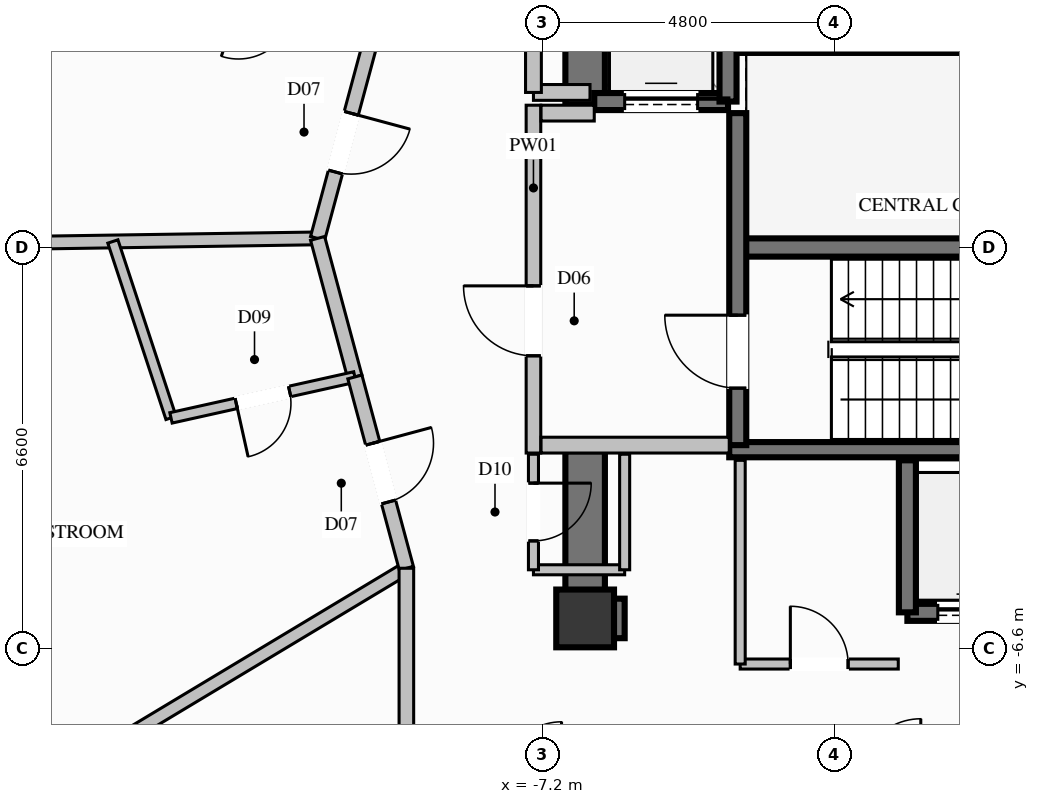
"""IFC4 building model, lengths in metres.
Left out: names, types, materials, properties, quantities, classifications, styles, units other than length and angle.
Written with IfcOpenShell. Run it as: python <this file> out.ifc"""

import sys

from ifc_helpers import new_model, si_unit, direction, frame, frame_2d, origin, origin_2d, place, context, subcontext, project, spatial, rectangle, extrude, element, fill, save


model = new_model("IFC4")
c1 = context("Model", 3, precision=1e-05, world=origin(), true_north=direction((0.0, 1.0)))
c2 = subcontext(c1, "Body", "Model", "MODEL_VIEW")
j1 = project(units=[si_unit("LENGTHUNIT", "METRE"), si_unit("PLANEANGLEUNIT", "RADIAN")], contexts=[c1])
p1 = place(None, origin())
s1 = spatial("IfcSite", under=j1, at=p1, CompositionType="ELEMENT")
p2 = place(p1, origin())
s2 = spatial("IfcBuilding", under=s1, at=p2, CompositionType="ELEMENT")
p3 = place(p2, frame((0.0, 0.0, 135.0)))
s3 = spatial("IfcBuildingStorey", under=s2, at=p3, CompositionType="ELEMENT", Elevation=135.0)
p4 = place(p3, frame((-6.5, -6.1, 0.0), z_axis=(0.0, 0.0, 1.0), x_axis=(1.0, 0.0, 0.0)))
e1 = element("IfcColumn", 1, at=p4, inside=s3, PredefinedType="COLUMN", context=c2, shape_type="SweptSolid", body=[
    extrude(rectangle(XDim=0.95, YDim=0.95, at=origin_2d()), origin(), (0.0, 0.0, 1.0), 3.6),
])
p5 = place(p3, frame((-3.99, 0.0, 0.0), z_axis=(0.0, 0.0, 1.0), x_axis=(1.0, 0.0, 0.0)))
e2 = element("IfcWall", 2, at=p5, inside=s3, PredefinedType="SHEAR", context=c2, shape_type="SweptSolid", body=[
    extrude(rectangle(XDim=7.98, YDim=0.3, at=frame_2d((3.99, 0.0))), origin(), (0.0, 0.0, 1.0), 3.6),
])
for number, where, z_axis, x_axis in (
    (3, (-4.13, -3.325, 0.0), (0.0, 0.0, 1.0), (1.0, 0.0, 0.0)),
    (4, (-4.13, 3.325, 0.0), (0.0, 0.0, 1.0), (1.0, 0.0, 0.0)),
):
    element("IfcWall", number, at=place(p3, frame(where, z_axis=z_axis, x_axis=x_axis)), inside=s3, PredefinedType="SOLIDWALL", context=c2, shape_type="SweptSolid", body=[
        extrude(rectangle(XDim=8.26, YDim=0.25, at=frame_2d((4.13, 0.0))), origin(), (0.0, 0.0, 1.0), 3.6),
    ])
p6 = place(p3, frame((-6.175, -6.1, 0.0), z_axis=(0.0, 0.0, 1.0), x_axis=(1.0, 0.0, 0.0)))
e5 = element("IfcWall", 5, at=p6, inside=s3, PredefinedType="SHEAR", context=c2, shape_type="SweptSolid", body=[
    extrude(rectangle(XDim=0.325, YDim=0.65, at=frame_2d((0.163, 0.0))), origin(), (0.0, 0.0, 1.0), 3.6),
])
p7 = place(p3, frame((-6.5, 2.35, 0.0), z_axis=(0.0, 0.0, 1.0), x_axis=(0.0, 1.0, 0.0)))
e6 = element("IfcWall", 6, at=p7, inside=s3, PredefinedType="SHEAR", context=c2, shape_type="SweptSolid", body=[
    extrude(rectangle(XDim=4.075, YDim=0.65, at=frame_2d((2.038, 0.0))), origin(), (0.0, 0.0, 1.0), 3.6),
])
p8 = place(p3, frame((-6.5, -6.425, 0.0), z_axis=(0.0, 0.0, 1.0), x_axis=(0.0, 1.0, 0.0)))
e7 = element("IfcWall", 7, at=p8, inside=s3, PredefinedType="SHEAR", context=c2, shape_type="SweptSolid", body=[
    extrude(rectangle(XDim=3.075, YDim=0.65, at=frame_2d((1.538, 0.0))), origin(), (0.0, 0.0, 1.0), 3.6),
])
p9 = place(p3, frame((-1.2, -6.0, 0.0), z_axis=(0.0, 0.0, 1.0), x_axis=(1.0, 0.0, 0.0)))
e8 = element("IfcWall", 8, at=p9, inside=s3, PredefinedType="SOLIDWALL", context=c2, shape_type="SweptSolid", body=[
    extrude(rectangle(XDim=2.1, YDim=0.28, at=frame_2d((1.05, 0.0))), origin(), (0.0, 0.0, 1.0), 3.35),
])
p10 = place(p9, frame((0.5, 0.0, 0.0)))
e9 = element("IfcOpeningElement", 9, at=p10, cuts=e8, PredefinedType="OPENING", context=c2, shape_type="SweptSolid", body=[
    extrude(rectangle(XDim=1.1, YDim=2.2, at=frame_2d((0.55, 1.1))), frame((0.0, 0.15, 0.0), z_axis=(0.0, -1.0, 0.0), x_axis=(1.0, 0.0, 0.0)), (0.0, 0.0, 1.0), 0.3),
])
p11 = place(p3, frame((-1.2, -3.5, 0.0), z_axis=(0.0, 0.0, 1.0), x_axis=(0.0, -1.0, 0.0)))
e10 = element("IfcWall", 10, at=p11, inside=s3, PredefinedType="SOLIDWALL", context=c2, shape_type="SweptSolid", body=[
    extrude(rectangle(XDim=2.5, YDim=0.28, at=frame_2d((1.25, 0.0))), origin(), (0.0, 0.0, 1.0), 3.35),
])
p12 = place(p3, frame((-6.35, 2.4, 0.0), z_axis=(0.0, 0.0, 1.0), x_axis=(1.0, 0.0, 0.0)))
e11 = element("IfcWall", 11, at=p12, inside=s3, PredefinedType="SOLIDWALL", context=c2, shape_type="SweptSolid", body=[
    extrude(rectangle(XDim=2.2, YDim=0.28, at=frame_2d((1.1, 0.0))), origin(), (0.0, 0.0, 1.0), 3.35),
])
p13 = place(p12, frame((0.5, 0.0, 0.0)))
e12 = element("IfcOpeningElement", 12, at=p13, cuts=e11, PredefinedType="OPENING", context=c2, shape_type="SweptSolid", body=[
    extrude(rectangle(XDim=1.2, YDim=2.2, at=frame_2d((0.6, 1.1))), frame((0.0, 0.15, 0.0), z_axis=(0.0, -1.0, 0.0), x_axis=(1.0, 0.0, 0.0)), (0.0, 0.0, 1.0), 0.3),
])
p14 = place(p3, frame((-4.15, 2.4, 0.0), z_axis=(0.0, 0.0, 1.0), x_axis=(0.0, 1.0, 0.0)))
e13 = element("IfcWall", 13, at=p14, inside=s3, PredefinedType="SOLIDWALL", context=c2, shape_type="SweptSolid", body=[
    extrude(rectangle(XDim=2.7, YDim=0.28, at=frame_2d((1.35, 0.0))), origin(), (0.0, 0.0, 1.0), 3.35),
])
p15 = place(p3, frame((-3.99, -3.25, 0.0), z_axis=(0.0, 0.0, 1.0), x_axis=(0.0, 1.0, 0.0)))
e14 = element("IfcWall", 14, at=p15, inside=s3, PredefinedType="SOLIDWALL", context=c2, shape_type="SweptSolid", body=[
    extrude(rectangle(XDim=5.46, YDim=0.28, at=frame_2d((2.73, 0.0))), origin(), (0.0, 0.0, 1.0), 3.35),
])
p16 = place(p15, frame((0.937, 0.0, 0.0)))
e15 = element("IfcOpeningElement", 15, at=p16, cuts=e14, PredefinedType="OPENING", context=c2, shape_type="SweptSolid", body=[
    extrude(rectangle(XDim=1.2, YDim=2.2, at=frame_2d((0.6, 1.1))), frame((0.0, 0.15, 0.0), z_axis=(0.0, -1.0, 0.0), x_axis=(1.0, 0.0, 0.0)), (0.0, 0.0, 1.0), 0.3),
])
p17 = place(p3, frame((-7.35, -3.38, 0.0), z_axis=(0.0, 0.0, 1.0), x_axis=(0.0, 1.0, 0.0)))
e16 = element("IfcWall", 16, at=p17, inside=s3, PredefinedType="PARTITIONING", context=c2, shape_type="SweptSolid", body=[
    extrude(rectangle(XDim=5.72, YDim=0.24, at=frame_2d((2.86, 0.0))), origin(), (0.0, 0.0, 1.0), 2.435),
])
p18 = place(p17, frame((1.599, 0.0, 0.0)))
e17 = element("IfcOpeningElement", 17, at=p18, cuts=e16, PredefinedType="OPENING", context=c2, shape_type="SweptSolid", body=[
    extrude(rectangle(XDim=1.15, YDim=2.2, at=frame_2d((0.575, 1.1))), frame((0.0, 0.13, 0.0), z_axis=(0.0, -1.0, 0.0), x_axis=(1.0, 0.0, 0.0)), (0.0, 0.0, 1.0), 0.26),
])
p19 = place(p3, frame((-7.225, -3.25, 0.0), z_axis=(0.0, 0.0, 1.0), x_axis=(1.0, 0.0, 0.0)))
e18 = element("IfcWall", 18, at=p19, inside=s3, PredefinedType="PARTITIONING", context=c2, shape_type="SweptSolid", body=[
    extrude(rectangle(XDim=3.095, YDim=0.26, at=frame_2d((1.548, 0.0))), origin(), (0.0, 0.0, 1.0), 3.35),
])
p20 = place(p3, frame((-7.225, 2.21, 0.0), z_axis=(0.0, 0.0, 1.0), x_axis=(1.0, 0.0, 0.0)))
e19 = element("IfcWall", 19, at=p20, inside=s3, PredefinedType="PARTITIONING", context=c2, shape_type="SweptSolid", body=[
    extrude(rectangle(XDim=0.875, YDim=0.26, at=frame_2d((0.438, 0.0))), origin(), (0.0, 0.0, 1.0), 3.35),
])
p21 = place(p3, frame((-7.35, 2.55, 0.0), z_axis=(0.0, 0.0, 1.0), x_axis=(1.0, 0.0, 0.0)))
e20 = element("IfcWall", 20, at=p21, inside=s3, PredefinedType="PARTITIONING", context=c2, shape_type="SweptSolid", body=[
    extrude(rectangle(XDim=0.93, YDim=0.26, at=frame_2d((0.465, 0.0))), origin(), (0.0, 0.0, 1.0), 3.35),
])
p22 = place(p3, frame((-7.35, 2.55, 0.0), z_axis=(0.0, 0.0, 1.0), x_axis=(0.0, 1.0, 0.0)))
e21 = element("IfcWall", 21, at=p22, inside=s3, PredefinedType="PARTITIONING", context=c2, shape_type="SweptSolid", body=[
    extrude(rectangle(XDim=2.4, YDim=0.26, at=frame_2d((1.2, 0.0))), origin(), (0.0, 0.0, 1.0), 2.435),
])
p23 = place(p22, frame((0.775, 0.0, 0.0)))
e22 = element("IfcOpeningElement", 22, at=p23, cuts=e21, PredefinedType="OPENING", context=c2, shape_type="SweptSolid", body=[
    extrude(rectangle(XDim=0.85, YDim=2.05, at=frame_2d((0.425, 1.025))), frame((0.0, 0.14, 0.0), z_axis=(0.0, -1.0, 0.0), x_axis=(1.0, 0.0, 0.0)), (0.0, 0.0, 1.0), 0.28),
])
p24 = place(p3, frame((-7.35, -5.3, 0.0), z_axis=(0.0, 0.0, 1.0), x_axis=(1.0, 0.0, 0.0)))
e23 = element("IfcWall", 23, at=p24, inside=s3, PredefinedType="PARTITIONING", context=c2, shape_type="SweptSolid", body=[
    extrude(rectangle(XDim=1.5, YDim=0.165, at=frame_2d((0.75, 0.0))), origin(), (0.0, 0.0, 1.0), 2.435),
])
p25 = place(p3, frame((-5.85, -5.3, 0.0), z_axis=(0.0, 0.0, 1.0), x_axis=(0.0, 1.0, 0.0)))
e24 = element("IfcWall", 24, at=p25, inside=s3, PredefinedType="PARTITIONING", context=c2, shape_type="SweptSolid", body=[
    extrude(rectangle(XDim=1.9, YDim=0.165, at=frame_2d((0.95, 0.0))), origin(), (0.0, 0.0, 1.0), 2.435),
])
p26 = place(p3, frame((-7.35, -3.4, 0.0), z_axis=(0.0, 0.0, 1.0), x_axis=(0.0, -1.0, 0.0)))
e25 = element("IfcWall", 25, at=p26, inside=s3, PredefinedType="PARTITIONING", context=c2, shape_type="SweptSolid", body=[
    extrude(rectangle(XDim=1.9, YDim=0.165, at=frame_2d((0.95, 0.0))), origin(), (0.0, 0.0, 1.0), 3.35),
])
p27 = place(p26, frame((0.475, 0.0, 0.0)))
e26 = element("IfcOpeningElement", 26, at=p27, cuts=e25, PredefinedType="OPENING", context=c2, shape_type="SweptSolid", body=[
    extrude(rectangle(XDim=0.95, YDim=2.1, at=frame_2d((0.475, 1.05))), frame((0.0, 0.093, 0.0), z_axis=(0.0, -1.0, 0.0), x_axis=(1.0, 0.0, 0.0)), (0.0, 0.0, 1.0), 0.185),
])
p28 = place(p3, frame((-3.95, -6.85, 0.0), z_axis=(0.0, 0.0, 1.0), x_axis=(1.0, 0.0, 0.0)))
e27 = element("IfcWall", 27, at=p28, inside=s3, PredefinedType="PARTITIONING", context=c2, shape_type="SweptSolid", body=[
    extrude(rectangle(XDim=2.6, YDim=0.165, at=frame_2d((1.3, 0.0))), origin(), (0.0, 0.0, 1.0), 2.435),
])
p29 = place(p28, frame((0.825, 0.0, 0.0)))
e28 = element("IfcOpeningElement", 28, at=p29, cuts=e27, PredefinedType="OPENING", context=c2, shape_type="SweptSolid", body=[
    extrude(rectangle(XDim=0.95, YDim=2.1, at=frame_2d((0.475, 1.05))), frame((0.0, 0.093, 0.0), z_axis=(0.0, -1.0, 0.0), x_axis=(1.0, 0.0, 0.0)), (0.0, 0.0, 1.0), 0.185),
])
p30 = place(p3, frame((-3.95, -3.5, 0.0), z_axis=(0.0, 0.0, 1.0), x_axis=(0.0, -1.0, 0.0)))
e29 = element("IfcWall", 29, at=p30, inside=s3, PredefinedType="PARTITIONING", context=c2, shape_type="SweptSolid", body=[
    extrude(rectangle(XDim=3.35, YDim=0.165, at=frame_2d((1.675, 0.0))), origin(), (0.0, 0.0, 1.0), 3.35),
])
p31 = place(p3, frame((-10.9, 0.15, 0.0), z_axis=(0.0, 0.0, 1.0), x_axis=(-0.999885899777, -0.015105873936, 0.0)))
e30 = element("IfcWall", 30, at=p31, inside=s3, PredefinedType="PARTITIONING", context=c2, shape_type="SweptSolid", body=[
    extrude(rectangle(XDim=5.56, YDim=0.21, at=frame_2d((2.78, 0.0))), origin(), (0.0, 0.0, 1.0), 2.419),
])
p32 = place(p3, frame((-9.44, -5.275, 0.0), z_axis=(0.0, 0.0, 1.0), x_axis=(-0.857218051621, -0.514953601769, 0.0)))
e31 = element("IfcWall", 31, at=p32, inside=s3, PredefinedType="PARTITIONING", context=c2, shape_type="SweptSolid", body=[
    extrude(rectangle(XDim=5.645, YDim=0.21, at=frame_2d((2.823, 0.0))), origin(), (0.0, 0.0, 1.0), 2.717),
])
p33 = place(p3, frame((-10.053, 3.297, 0.0), z_axis=(0.0, 0.0, 1.0), x_axis=(-0.25985795735, -0.965646851598, 0.0)))
e32 = element("IfcWall", 32, at=p33, inside=s3, PredefinedType="PARTITIONING", context=c2, shape_type="SweptSolid", body=[
    extrude(rectangle(XDim=3.259, YDim=0.24, at=frame_2d((1.63, 0.0))), origin(), (0.0, 0.0, 1.0), 3.35),
])
p34 = place(p33, frame((1.129, 0.0, 0.0)))
e33 = element("IfcOpeningElement", 33, at=p34, cuts=e32, PredefinedType="OPENING", context=c2, shape_type="SweptSolid", body=[
    extrude(rectangle(XDim=1.0, YDim=2.2, at=frame_2d((0.5, 1.1))), frame((0.0, 0.13, 0.0), z_axis=(0.0, -1.0, 0.0), x_axis=(1.0, 0.0, 0.0)), (0.0, 0.0, 1.0), 0.26),
])
p35 = place(p3, frame((-10.9, 0.15, 0.0), z_axis=(0.0, 0.0, 1.0), x_axis=(0.259684059781, -0.965693631073, 0.0)))
e34 = element("IfcWall", 34, at=p35, inside=s3, PredefinedType="PARTITIONING", context=c2, shape_type="SweptSolid", body=[
    extrude(rectangle(XDim=2.36, YDim=0.24, at=frame_2d((1.18, 0.0))), origin(), (0.0, 0.0, 1.0), 3.35),
])
p36 = place(p3, frame((-14.267, 0.099, 0.0), z_axis=(0.0, 0.0, 1.0), x_axis=(0.31298893544, -0.949756772175, 0.0)))
e35 = element("IfcWall", 35, at=p36, inside=s3, PredefinedType="PLUMBINGWALL", context=c2, shape_type="SweptSolid", body=[
    extrude(rectangle(XDim=3.055, YDim=0.175, at=frame_2d((1.527, 0.0))), origin(), (0.0, 0.0, 1.0), 3.35),
])
p37 = place(p3, frame((-10.287, -2.129, 0.0), z_axis=(0.0, 0.0, 1.0), x_axis=(-0.976110974076, -0.217272562209, 0.0)))
e36 = element("IfcWall", 36, at=p37, inside=s3, PredefinedType="PLUMBINGWALL", context=c2, shape_type="SweptSolid", body=[
    extrude(rectangle(XDim=3.098, YDim=0.175, at=frame_2d((1.549, 0.0))), origin(), (0.0, 0.0, 1.0), 3.35),
])
p38 = place(p37, frame((1.099, 0.0, 0.0)))
e37 = element("IfcOpeningElement", 37, at=p38, cuts=e36, PredefinedType="OPENING", context=c2, shape_type="SweptSolid", body=[
    extrude(rectangle(XDim=0.9, YDim=2.1, at=frame_2d((0.45, 1.05))), frame((0.0, 0.098, 0.0), z_axis=(0.0, -1.0, 0.0), x_axis=(1.0, 0.0, 0.0)), (0.0, 0.0, 1.0), 0.195),
])
p39 = place(p3, frame((-10.287, -2.129, 0.0), z_axis=(0.0, 0.0, 1.0), x_axis=(0.260021844471, -0.965602734253, 0.0)))
e38 = element("IfcWall", 38, at=p39, inside=s3, PredefinedType="PARTITIONING", context=c2, shape_type="SweptSolid", body=[
    extrude(rectangle(XDim=3.258, YDim=0.24, at=frame_2d((1.629, 0.0))), origin(), (0.0, 0.0, 1.0), 3.35),
])
p40 = place(p39, frame((1.129, 0.0, 0.0)))
e39 = element("IfcOpeningElement", 39, at=p40, cuts=e38, PredefinedType="OPENING", context=c2, shape_type="SweptSolid", body=[
    extrude(rectangle(XDim=1.0, YDim=2.2, at=frame_2d((0.5, 1.1))), frame((0.0, 0.13, 0.0), z_axis=(0.0, -1.0, 0.0), x_axis=(1.0, 0.0, 0.0)), (0.0, 0.0, 1.0), 0.26),
])
p41 = place(p3, frame((-9.44, -5.275, 0.0), z_axis=(0.0, 0.0, 1.0), x_axis=(0.0, -1.0, 0.0)))
e40 = element("IfcWall", 40, at=p41, inside=s3, PredefinedType="PARTITIONING", context=c2, shape_type="SweptSolid", body=[
    extrude(rectangle(XDim=3.475, YDim=0.24, at=frame_2d((1.738, 0.0))), origin(), (0.0, 0.0, 1.0), 3.35),
])
p42 = place(p10, origin())
e41 = element("IfcDoor", 41, at=p42, inside=s3, OperationType="SLIDING_TO_LEFT", PredefinedType="DOOR", context=c2, shape_type="SweptSolid", body=[
    extrude(rectangle(XDim=1.1, YDim=2.2, at=frame_2d((0.55, 1.1))), frame((0.0, 0.025, 0.0), z_axis=(0.0, -1.0, 0.0), x_axis=(1.0, 0.0, 0.0)), (0.0, 0.0, 1.0), 0.05),
])
fill(e9, e41)
p43 = place(p13, origin())
e42 = element("IfcDoor", 42, at=p43, inside=s3, OperationType="SLIDING_TO_LEFT", PredefinedType="DOOR", context=c2, shape_type="SweptSolid", body=[
    extrude(rectangle(XDim=1.2, YDim=2.2, at=frame_2d((0.6, 1.1))), frame((0.0, 0.025, 0.0), z_axis=(0.0, -1.0, 0.0), x_axis=(1.0, 0.0, 0.0)), (0.0, 0.0, 1.0), 0.05),
])
fill(e12, e42)
p44 = place(p16, origin())
e43 = element("IfcDoor", 43, at=p44, inside=s3, OperationType="SINGLE_SWING_RIGHT", PredefinedType="DOOR", context=c2, shape_type="SweptSolid", body=[
    extrude(rectangle(XDim=1.2, YDim=2.2, at=frame_2d((0.6, 1.1))), frame((0.0, 0.025, 0.0), z_axis=(0.0, -1.0, 0.0), x_axis=(1.0, 0.0, 0.0)), (0.0, 0.0, 1.0), 0.05),
])
fill(e15, e43)
p45 = place(p18, origin())
e44 = element("IfcDoor", 44, at=p45, inside=s3, OperationType="SINGLE_SWING_RIGHT", PredefinedType="DOOR", context=c2, shape_type="SweptSolid", body=[
    extrude(rectangle(XDim=1.15, YDim=2.2, at=frame_2d((0.575, 1.1))), frame((0.0, 0.025, 0.0), z_axis=(0.0, -1.0, 0.0), x_axis=(1.0, 0.0, 0.0)), (0.0, 0.0, 1.0), 0.05),
])
fill(e17, e44)
p46 = place(p27, origin())
e45 = element("IfcDoor", 45, at=p46, inside=s3, OperationType="SINGLE_SWING_LEFT", PredefinedType="DOOR", context=c2, shape_type="SweptSolid", body=[
    extrude(rectangle(XDim=0.95, YDim=2.1, at=frame_2d((0.475, 1.05))), frame((0.0, 0.025, 0.0), z_axis=(0.0, -1.0, 0.0), x_axis=(1.0, 0.0, 0.0)), (0.0, 0.0, 1.0), 0.05),
])
fill(e26, e45)
p47 = place(p29, origin())
e46 = element("IfcDoor", 46, at=p47, inside=s3, OperationType="SINGLE_SWING_LEFT", PredefinedType="DOOR", context=c2, shape_type="SweptSolid", body=[
    extrude(rectangle(XDim=0.95, YDim=2.1, at=frame_2d((0.475, 1.05))), frame((0.0, 0.025, 0.0), z_axis=(0.0, -1.0, 0.0), x_axis=(1.0, 0.0, 0.0)), (0.0, 0.0, 1.0), 0.05),
])
fill(e28, e46)
p48 = place(p34, origin())
e47 = element("IfcDoor", 47, at=p48, inside=s3, OperationType="SINGLE_SWING_LEFT", PredefinedType="DOOR", context=c2, shape_type="SweptSolid", body=[
    extrude(rectangle(XDim=1.0, YDim=2.2, at=frame_2d((0.5, 1.1))), frame((0.0, 0.025, 0.0), z_axis=(0.0, -1.0, 0.0), x_axis=(1.0, 0.0, 0.0)), (0.0, 0.0, 1.0), 0.05),
])
fill(e33, e47)
p49 = place(p38, origin())
e48 = element("IfcDoor", 48, at=p49, inside=s3, OperationType="SINGLE_SWING_RIGHT", PredefinedType="DOOR", context=c2, shape_type="SweptSolid", body=[
    extrude(rectangle(XDim=0.9, YDim=2.1, at=frame_2d((0.45, 1.05))), frame((0.0, 0.025, 0.0), z_axis=(0.0, -1.0, 0.0), x_axis=(1.0, 0.0, 0.0)), (0.0, 0.0, 1.0), 0.05),
])
fill(e37, e48)
p50 = place(p40, origin())
e49 = element("IfcDoor", 49, at=p50, inside=s3, OperationType="SINGLE_SWING_LEFT", PredefinedType="DOOR", context=c2, shape_type="SweptSolid", body=[
    extrude(rectangle(XDim=1.0, YDim=2.2, at=frame_2d((0.5, 1.1))), frame((0.0, 0.025, 0.0), z_axis=(0.0, -1.0, 0.0), x_axis=(1.0, 0.0, 0.0)), (0.0, 0.0, 1.0), 0.05),
])
fill(e39, e49)
save(model, sys.argv[1])
